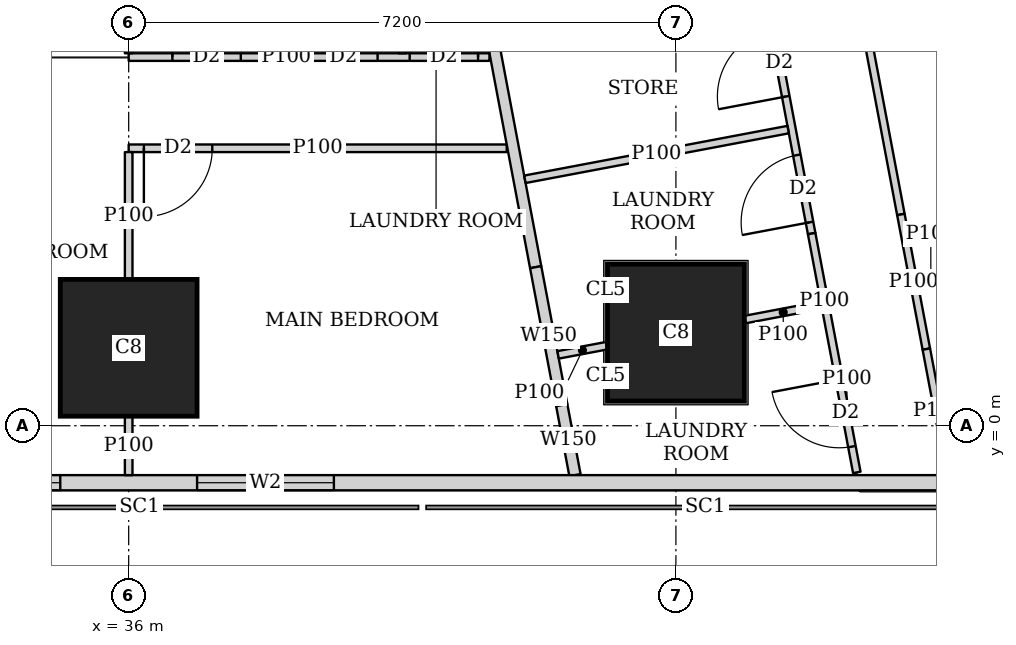
"""IFC4 building model, lengths in metres.
Left out: names, types, materials, properties, quantities, classifications, styles, units other than length and angle.
Written with IfcOpenShell. Run it as: python <this file> out.ifc"""

import sys

from ifc_helpers import new_model, si_unit, direction, frame, frame_2d, origin, origin_2d, place, context, subcontext, project, spatial, rectangle, extrude, element, fill, save


model = new_model("IFC4")
c1 = context("Model", 3, precision=1e-05, world=origin(), true_north=direction((0.0, 1.0)))
c2 = subcontext(c1, "Body", "Model", "MODEL_VIEW")
j1 = project(units=[si_unit("LENGTHUNIT", "METRE"), si_unit("PLANEANGLEUNIT", "RADIAN")], contexts=[c1])
p1 = place(None, origin())
s1 = spatial("IfcSite", under=j1, at=p1, CompositionType="ELEMENT")
p2 = place(p1, origin())
s2 = spatial("IfcBuilding", under=s1, at=p2, CompositionType="ELEMENT")
p3 = place(p2, frame((0.0, 0.0, 135.8)))
s3 = spatial("IfcBuildingStorey", under=s2, at=p3, CompositionType="ELEMENT", Elevation=135.8)
for number, where, z_axis, x_axis in (
    (1, (36.0, 1.025, 0.0), (0.0, 0.0, 1.0), (1.0, 0.0, 0.0)),
    (2, (43.2, 1.225, 0.0), (0.0, 0.0, 1.0), (1.0, 0.0, 0.0)),
):
    element("IfcColumn", number, at=place(p3, frame(where, z_axis=z_axis, x_axis=x_axis)), inside=s3, PredefinedType="COLUMN", context=c2, shape_type="SweptSolid", body=[
        extrude(rectangle(XDim=1.8, YDim=1.8, at=origin_2d()), origin(), (0.0, 0.0, 1.0), 3.75),
    ])
p4 = place(p3, frame((2.163, -0.75, 0.0), z_axis=(0.0, 0.0, 1.0), x_axis=(1.0, 0.0, 0.0)))
e3 = element("IfcWall", 3, at=p4, inside=s3, PredefinedType="SOLIDWALL", context=c2, shape_type="SweptSolid", body=[
    extrude(rectangle(XDim=45.628, YDim=0.2, at=frame_2d((22.814, 0.0))), origin(), (0.0, 0.0, 1.0), 3.5),
])
p5 = place(p4, frame((9.537, 0.0, 0.9)))
e4 = element("IfcOpeningElement", 4, at=p5, cuts=e3, PredefinedType="OPENING", context=c2, shape_type="SweptSolid", body=[
    extrude(rectangle(XDim=1.8, YDim=1.5, at=frame_2d((0.9, 0.75))), frame((0.0, 0.11, 0.0), z_axis=(0.0, -1.0, 0.0), x_axis=(1.0, 0.0, 0.0)), (0.0, 0.0, 1.0), 0.22),
])
p6 = place(p4, frame((13.137, 0.0, 0.9)))
e5 = element("IfcOpeningElement", 5, at=p6, cuts=e3, PredefinedType="OPENING", context=c2, shape_type="SweptSolid", body=[
    extrude(rectangle(XDim=1.8, YDim=1.5, at=frame_2d((0.9, 0.75))), frame((0.0, 0.11, 0.0), z_axis=(0.0, -1.0, 0.0), x_axis=(1.0, 0.0, 0.0)), (0.0, 0.0, 1.0), 0.22),
])
p7 = place(p4, frame((16.737, 0.0, 0.9)))
e6 = element("IfcOpeningElement", 6, at=p7, cuts=e3, PredefinedType="OPENING", context=c2, shape_type="SweptSolid", body=[
    extrude(rectangle(XDim=1.8, YDim=1.5, at=frame_2d((0.9, 0.75))), frame((0.0, 0.11, 0.0), z_axis=(0.0, -1.0, 0.0), x_axis=(1.0, 0.0, 0.0)), (0.0, 0.0, 1.0), 0.22),
])
p8 = place(p4, frame((20.337, 0.0, 0.9)))
e7 = element("IfcOpeningElement", 7, at=p8, cuts=e3, PredefinedType="OPENING", context=c2, shape_type="SweptSolid", body=[
    extrude(rectangle(XDim=1.8, YDim=1.5, at=frame_2d((0.9, 0.75))), frame((0.0, 0.11, 0.0), z_axis=(0.0, -1.0, 0.0), x_axis=(1.0, 0.0, 0.0)), (0.0, 0.0, 1.0), 0.22),
])
p9 = place(p4, frame((23.937, 0.0, 0.9)))
e8 = element("IfcOpeningElement", 8, at=p9, cuts=e3, PredefinedType="OPENING", context=c2, shape_type="SweptSolid", body=[
    extrude(rectangle(XDim=1.8, YDim=1.5, at=frame_2d((0.9, 0.75))), frame((0.0, 0.11, 0.0), z_axis=(0.0, -1.0, 0.0), x_axis=(1.0, 0.0, 0.0)), (0.0, 0.0, 1.0), 0.22),
])
p10 = place(p4, frame((27.537, 0.0, 0.9)))
e9 = element("IfcOpeningElement", 9, at=p10, cuts=e3, PredefinedType="OPENING", context=c2, shape_type="SweptSolid", body=[
    extrude(rectangle(XDim=1.8, YDim=1.5, at=frame_2d((0.9, 0.75))), frame((0.0, 0.11, 0.0), z_axis=(0.0, -1.0, 0.0), x_axis=(1.0, 0.0, 0.0)), (0.0, 0.0, 1.0), 0.22),
])
p11 = place(p4, frame((31.137, 0.0, 0.9)))
e10 = element("IfcOpeningElement", 10, at=p11, cuts=e3, PredefinedType="OPENING", context=c2, shape_type="SweptSolid", body=[
    extrude(rectangle(XDim=1.8, YDim=1.5, at=frame_2d((0.9, 0.75))), frame((0.0, 0.11, 0.0), z_axis=(0.0, -1.0, 0.0), x_axis=(1.0, 0.0, 0.0)), (0.0, 0.0, 1.0), 0.22),
])
p12 = place(p4, frame((34.737, 0.0, 0.9)))
e11 = element("IfcOpeningElement", 11, at=p12, cuts=e3, PredefinedType="OPENING", context=c2, shape_type="SweptSolid", body=[
    extrude(rectangle(XDim=1.8, YDim=1.5, at=frame_2d((0.9, 0.75))), frame((0.0, 0.11, 0.0), z_axis=(0.0, -1.0, 0.0), x_axis=(1.0, 0.0, 0.0)), (0.0, 0.0, 1.0), 0.22),
])
p13 = place(p3, frame((50.653, 2.703, 0.0), z_axis=(0.0, 0.0, 1.0), x_axis=(-0.185612026696, 0.982623109613, 0.0)))
e12 = element("IfcWall", 12, at=p13, inside=s3, PredefinedType="SOLIDWALL", context=c2, shape_type="SweptSolid", body=[
    extrude(rectangle(XDim=41.393, YDim=0.2, at=frame_2d((20.697, 0.0))), origin(), (0.0, 0.0, 1.0), 3.5),
])
p14 = place(p13, frame((1.633, 0.0, 0.9)))
e13 = element("IfcOpeningElement", 13, at=p14, cuts=e12, PredefinedType="OPENING", context=c2, shape_type="SweptSolid", body=[
    extrude(rectangle(XDim=1.8, YDim=1.5, at=frame_2d((0.9, 0.75))), frame((0.0, 0.11, 0.0), z_axis=(0.0, -1.0, 0.0), x_axis=(1.0, 0.0, 0.0)), (0.0, 0.0, 1.0), 0.22),
])
p15 = place(p13, frame((6.032, 0.0, 0.9)))
e14 = element("IfcOpeningElement", 14, at=p15, cuts=e12, PredefinedType="OPENING", context=c2, shape_type="SweptSolid", body=[
    extrude(rectangle(XDim=1.8, YDim=1.5, at=frame_2d((0.9, 0.75))), frame((0.0, 0.11, 0.0), z_axis=(0.0, -1.0, 0.0), x_axis=(1.0, 0.0, 0.0)), (0.0, 0.0, 1.0), 0.22),
])
p16 = place(p13, frame((9.848, 0.0, 0.9)))
e15 = element("IfcOpeningElement", 15, at=p16, cuts=e12, PredefinedType="OPENING", context=c2, shape_type="SweptSolid", body=[
    extrude(rectangle(XDim=1.8, YDim=1.5, at=frame_2d((0.9, 0.75))), frame((0.0, 0.11, 0.0), z_axis=(0.0, -1.0, 0.0), x_axis=(1.0, 0.0, 0.0)), (0.0, 0.0, 1.0), 0.22),
])
p17 = place(p13, frame((13.664, 0.0, 0.9)))
e16 = element("IfcOpeningElement", 16, at=p17, cuts=e12, PredefinedType="OPENING", context=c2, shape_type="SweptSolid", body=[
    extrude(rectangle(XDim=1.8, YDim=1.5, at=frame_2d((0.9, 0.75))), frame((0.0, 0.11, 0.0), z_axis=(0.0, -1.0, 0.0), x_axis=(1.0, 0.0, 0.0)), (0.0, 0.0, 1.0), 0.22),
])
p18 = place(p13, frame((17.481, 0.0, 0.9)))
e17 = element("IfcOpeningElement", 17, at=p18, cuts=e12, PredefinedType="OPENING", context=c2, shape_type="SweptSolid", body=[
    extrude(rectangle(XDim=1.8, YDim=1.5, at=frame_2d((0.9, 0.75))), frame((0.0, 0.11, 0.0), z_axis=(0.0, -1.0, 0.0), x_axis=(1.0, 0.0, 0.0)), (0.0, 0.0, 1.0), 0.22),
])
p19 = place(p13, frame((21.297, 0.0, 0.9)))
e18 = element("IfcOpeningElement", 18, at=p19, cuts=e12, PredefinedType="OPENING", context=c2, shape_type="SweptSolid", body=[
    extrude(rectangle(XDim=1.8, YDim=1.5, at=frame_2d((0.9, 0.75))), frame((0.0, 0.11, 0.0), z_axis=(0.0, -1.0, 0.0), x_axis=(1.0, 0.0, 0.0)), (0.0, 0.0, 1.0), 0.22),
])
p20 = place(p13, frame((25.113, 0.0, 0.9)))
e19 = element("IfcOpeningElement", 19, at=p20, cuts=e12, PredefinedType="OPENING", context=c2, shape_type="SweptSolid", body=[
    extrude(rectangle(XDim=1.8, YDim=1.5, at=frame_2d((0.9, 0.75))), frame((0.0, 0.11, 0.0), z_axis=(0.0, -1.0, 0.0), x_axis=(1.0, 0.0, 0.0)), (0.0, 0.0, 1.0), 0.22),
])
p21 = place(p13, frame((28.93, 0.0, 0.9)))
e20 = element("IfcOpeningElement", 20, at=p21, cuts=e12, PredefinedType="OPENING", context=c2, shape_type="SweptSolid", body=[
    extrude(rectangle(XDim=1.8, YDim=1.5, at=frame_2d((0.9, 0.75))), frame((0.0, 0.11, 0.0), z_axis=(0.0, -1.0, 0.0), x_axis=(1.0, 0.0, 0.0)), (0.0, 0.0, 1.0), 0.22),
])
p22 = place(p13, frame((32.746, 0.0, 0.9)))
e21 = element("IfcOpeningElement", 21, at=p22, cuts=e12, PredefinedType="OPENING", context=c2, shape_type="SweptSolid", body=[
    extrude(rectangle(XDim=1.8, YDim=1.5, at=frame_2d((0.9, 0.75))), frame((0.0, 0.11, 0.0), z_axis=(0.0, -1.0, 0.0), x_axis=(1.0, 0.0, 0.0)), (0.0, 0.0, 1.0), 0.22),
])
p23 = place(p13, frame((36.481, 0.0, 0.9)))
e22 = element("IfcOpeningElement", 22, at=p23, cuts=e12, PredefinedType="OPENING", context=c2, shape_type="SweptSolid", body=[
    extrude(rectangle(XDim=1.8, YDim=1.5, at=frame_2d((0.9, 0.75))), frame((0.0, 0.11, 0.0), z_axis=(0.0, -1.0, 0.0), x_axis=(1.0, 0.0, 0.0)), (0.0, 0.0, 1.0), 0.22),
])
p24 = place(p3, frame((33.623, 43.022, 0.0), z_axis=(0.0, 0.0, 1.0), x_axis=(0.185596841028, -0.98262597798, 0.0)))
e23 = element("IfcWall", 23, at=p24, inside=s3, PredefinedType="SOLIDWALL", context=c2, shape_type="SweptSolid", body=[
    extrude(rectangle(XDim=41.66, YDim=0.15, at=frame_2d((20.83, 0.0))), origin(), (0.0, 0.0, 1.0), 2.5),
])
p25 = place(p24, frame((20.242, 0.0, 0.0)))
e24 = element("IfcOpeningElement", 24, at=p25, cuts=e23, PredefinedType="OPENING", context=c2, shape_type="SweptSolid", body=[
    extrude(rectangle(XDim=1.0, YDim=2.1, at=frame_2d((0.5, 1.05))), frame((0.0, 0.085, 0.0), z_axis=(0.0, -1.0, 0.0), x_axis=(1.0, 0.0, 0.0)), (0.0, 0.0, 1.0), 0.17),
])
p26 = place(p24, frame((24.714, 0.0, 0.0)))
e25 = element("IfcOpeningElement", 25, at=p26, cuts=e23, PredefinedType="OPENING", context=c2, shape_type="SweptSolid", body=[
    extrude(rectangle(XDim=1.0, YDim=2.1, at=frame_2d((0.5, 1.05))), frame((0.0, 0.085, 0.0), z_axis=(0.0, -1.0, 0.0), x_axis=(1.0, 0.0, 0.0)), (0.0, 0.0, 1.0), 0.17),
])
p27 = place(p24, frame((31.206, 0.0, 0.0)))
e26 = element("IfcOpeningElement", 26, at=p27, cuts=e23, PredefinedType="OPENING", context=c2, shape_type="SweptSolid", body=[
    extrude(rectangle(XDim=1.0, YDim=2.1, at=frame_2d((0.5, 1.05))), frame((0.0, 0.085, 0.0), z_axis=(0.0, -1.0, 0.0), x_axis=(1.0, 0.0, 0.0)), (0.0, 0.0, 1.0), 0.17),
])
p28 = place(p3, frame((41.355, 2.086, 0.0), z_axis=(0.0, 0.0, 1.0), x_axis=(0.185708872674, -0.982604811005, 0.0)))
e27 = element("IfcWall", 27, at=p28, inside=s3, PredefinedType="SOLIDWALL", context=c2, shape_type="SweptSolid", body=[
    extrude(rectangle(XDim=1.847, YDim=0.15, at=frame_2d((0.924, 0.0))), origin(), (0.0, 0.0, 1.0), 2.1),
])
p29 = place(p3, frame((41.698, 0.271, 0.0), z_axis=(0.0, 0.0, 1.0), x_axis=(0.185735329995, -0.982599810295, 0.0)))
e28 = element("IfcWall", 28, at=p29, inside=s3, PredefinedType="SOLIDWALL", context=c2, shape_type="SweptSolid", body=[
    extrude(rectangle(XDim=0.937, YDim=0.15, at=frame_2d((0.469, 0.0))), origin(), (0.0, 0.0, 1.0), 3.5),
])
p30 = place(p3, frame((40.974, 3.65, 0.0), z_axis=(0.0, 0.0, 1.0), x_axis=(-1.0, 0.0, 0.0)))
e29 = element("IfcWall", 29, at=p30, inside=s3, PredefinedType="PARTITIONING", context=c2, shape_type="SweptSolid", body=[
    extrude(rectangle(XDim=4.974, YDim=0.1, at=frame_2d((2.487, 0.0))), origin(), (0.0, 0.0, 1.0), 3.5),
])
p31 = place(p30, frame((3.874, 0.0, 0.0)))
e30 = element("IfcOpeningElement", 30, at=p31, cuts=e29, PredefinedType="OPENING", context=c2, shape_type="SweptSolid", body=[
    extrude(rectangle(XDim=0.9, YDim=2.1, at=frame_2d((0.45, 1.05))), frame((0.0, 0.06, 0.0), z_axis=(0.0, -1.0, 0.0), x_axis=(1.0, 0.0, 0.0)), (0.0, 0.0, 1.0), 0.12),
])
p32 = place(p3, frame((40.747, 4.85, 0.0), z_axis=(0.0, 0.0, 1.0), x_axis=(-1.0, 0.0, 0.0)))
e31 = element("IfcWall", 31, at=p32, inside=s3, PredefinedType="PARTITIONING", context=c2, shape_type="SweptSolid", body=[
    extrude(rectangle(XDim=4.747, YDim=0.1, at=frame_2d((2.374, 0.0))), origin(), (0.0, 0.0, 1.0), 3.5),
])
p33 = place(p32, frame((3.272, 0.0, 0.0)))
e32 = element("IfcOpeningElement", 32, at=p33, cuts=e31, PredefinedType="OPENING", context=c2, shape_type="SweptSolid", body=[
    extrude(rectangle(XDim=0.9, YDim=2.1, at=frame_2d((0.45, 1.05))), frame((0.0, 0.06, 0.0), z_axis=(0.0, -1.0, 0.0), x_axis=(1.0, 0.0, 0.0)), (0.0, 0.0, 1.0), 0.12),
])
p34 = place(p32, frame((0.15, 0.0, 0.0)))
e33 = element("IfcOpeningElement", 33, at=p34, cuts=e31, PredefinedType="OPENING", context=c2, shape_type="SweptSolid", body=[
    extrude(rectangle(XDim=0.9, YDim=2.1, at=frame_2d((0.45, 1.05))), frame((0.0, 0.06, 0.0), z_axis=(0.0, -1.0, 0.0), x_axis=(1.0, 0.0, 0.0)), (0.0, 0.0, 1.0), 0.12),
])
p35 = place(p32, frame((1.472, 0.0, 0.0)))
e34 = element("IfcOpeningElement", 34, at=p35, cuts=e31, PredefinedType="OPENING", context=c2, shape_type="SweptSolid", body=[
    extrude(rectangle(XDim=0.9, YDim=2.1, at=frame_2d((0.45, 1.05))), frame((0.0, 0.06, 0.0), z_axis=(0.0, -1.0, 0.0), x_axis=(1.0, 0.0, 0.0)), (0.0, 0.0, 1.0), 0.12),
])
p36 = place(p3, frame((36.0, -0.65, 0.0), z_axis=(0.0, 0.0, 1.0), x_axis=(0.0, 1.0, 0.0)))
e35 = element("IfcWall", 35, at=p36, inside=s3, PredefinedType="PARTITIONING", context=c2, shape_type="SweptSolid", body=[
    extrude(rectangle(XDim=0.774, YDim=0.1, at=frame_2d((0.387, 0.0))), origin(), (0.0, 0.0, 1.0), 3.5),
])
p37 = place(p3, frame((36.0, 1.926, 0.0), z_axis=(0.0, 0.0, 1.0), x_axis=(0.0, 1.0, 0.0)))
e36 = element("IfcWall", 36, at=p37, inside=s3, PredefinedType="PARTITIONING", context=c2, shape_type="SweptSolid", body=[
    extrude(rectangle(XDim=1.674, YDim=0.1, at=frame_2d((0.837, 0.0))), origin(), (0.0, 0.0, 1.0), 3.5),
])
p38 = place(p3, frame((36.0, 4.9, 0.0), z_axis=(0.0, 0.0, 1.0), x_axis=(0.0, 1.0, 0.0)))
e37 = element("IfcWall", 37, at=p38, inside=s3, PredefinedType="PARTITIONING", context=c2, shape_type="SweptSolid", body=[
    extrude(rectangle(XDim=1.849, YDim=0.1, at=frame_2d((0.925, 0.0))), origin(), (0.0, 0.0, 1.0), 3.5),
])
for number, where, z_axis, x_axis in (
    (38, (39.6, 4.9, 0.0), (0.0, 0.0, 1.0), (0.0, 1.0, 0.0)),
    (39, (38.05, 4.9, 0.0), (0.0, 0.0, 1.0), (0.0, 1.0, 0.0)),
):
    element("IfcWall", number, at=place(p3, frame(where, z_axis=z_axis, x_axis=x_axis)), inside=s3, PredefinedType="PARTITIONING", context=c2, shape_type="SweptSolid", body=[
        extrude(rectangle(XDim=3.525, YDim=0.1, at=frame_2d((1.763, 0.0))), origin(), (0.0, 0.0, 1.0), 3.5),
    ])
p39 = place(p3, frame((44.727, 10.366, 0.0), z_axis=(0.0, 0.0, 1.0), x_axis=(0.185578957652, -0.982629355595, 0.0)))
e40 = element("IfcWall", 40, at=p39, inside=s3, PredefinedType="PARTITIONING", context=c2, shape_type="SweptSolid", body=[
    extrude(rectangle(XDim=7.721, YDim=0.1, at=frame_2d((3.86, 0.0))), origin(), (0.0, 0.0, 1.0), 3.5),
])
p40 = place(p39, frame((0.151, 0.0, 0.0)))
e41 = element("IfcOpeningElement", 41, at=p40, cuts=e40, PredefinedType="OPENING", context=c2, shape_type="SweptSolid", body=[
    extrude(rectangle(XDim=0.9, YDim=2.1, at=frame_2d((0.45, 1.05))), frame((0.0, 0.06, 0.0), z_axis=(0.0, -1.0, 0.0), x_axis=(1.0, 0.0, 0.0)), (0.0, 0.0, 1.0), 0.12),
])
p41 = place(p39, frame((3.806, 0.0, 0.0)))
e42 = element("IfcOpeningElement", 42, at=p41, cuts=e40, PredefinedType="OPENING", context=c2, shape_type="SweptSolid", body=[
    extrude(rectangle(XDim=0.9, YDim=2.1, at=frame_2d((0.45, 1.05))), frame((0.0, 0.06, 0.0), z_axis=(0.0, -1.0, 0.0), x_axis=(1.0, 0.0, 0.0)), (0.0, 0.0, 1.0), 0.12),
])
p42 = place(p3, frame((46.16, 2.779, 0.0), z_axis=(0.0, 0.0, 1.0), x_axis=(0.18597295662, -0.982554863306, 0.0)))
e43 = element("IfcWall", 43, at=p42, inside=s3, PredefinedType="PARTITIONING", context=c2, shape_type="SweptSolid", body=[
    extrude(rectangle(XDim=1.802, YDim=0.1, at=frame_2d((0.901, 0.0))), origin(), (0.0, 0.0, 1.0), 2.1),
])
p43 = place(p3, frame((46.495, 1.008, 0.0), z_axis=(0.0, 0.0, 1.0), x_axis=(0.185535059532, -0.982637645159, 0.0)))
e44 = element("IfcWall", 44, at=p43, inside=s3, PredefinedType="PARTITIONING", context=c2, shape_type="SweptSolid", body=[
    extrude(rectangle(XDim=1.644, YDim=0.1, at=frame_2d((0.822, 0.0))), origin(), (0.0, 0.0, 1.0), 3.5),
])
p44 = place(p3, frame((43.999, 7.755, 0.0), z_axis=(0.0, 0.0, 1.0), x_axis=(0.185565904578, -0.982631820703, 0.0)))
e45 = element("IfcWall", 45, at=p44, inside=s3, PredefinedType="PARTITIONING", context=c2, shape_type="SweptSolid", body=[
    extrude(rectangle(XDim=5.319, YDim=0.1, at=frame_2d((2.66, 0.0))), origin(), (0.0, 0.0, 1.0), 3.5),
])
p45 = place(p44, frame((1.0, 0.0, 0.0)))
e46 = element("IfcOpeningElement", 46, at=p45, cuts=e45, PredefinedType="OPENING", context=c2, shape_type="SweptSolid", body=[
    extrude(rectangle(XDim=0.9, YDim=2.1, at=frame_2d((0.45, 1.05))), frame((0.0, 0.06, 0.0), z_axis=(0.0, -1.0, 0.0), x_axis=(1.0, 0.0, 0.0)), (0.0, 0.0, 1.0), 0.12),
])
p46 = place(p44, frame((4.269, 0.0, 0.0)))
e47 = element("IfcOpeningElement", 47, at=p46, cuts=e45, PredefinedType="OPENING", context=c2, shape_type="SweptSolid", body=[
    extrude(rectangle(XDim=0.9, YDim=2.1, at=frame_2d((0.45, 1.05))), frame((0.0, 0.06, 0.0), z_axis=(0.0, -1.0, 0.0), x_axis=(1.0, 0.0, 0.0)), (0.0, 0.0, 1.0), 0.12),
])
p47 = place(p44, frame((2.585, 0.0, 0.0)))
e48 = element("IfcOpeningElement", 48, at=p47, cuts=e45, PredefinedType="OPENING", context=c2, shape_type="SweptSolid", body=[
    extrude(rectangle(XDim=0.9, YDim=2.1, at=frame_2d((0.45, 1.05))), frame((0.0, 0.06, 0.0), z_axis=(0.0, -1.0, 0.0), x_axis=(1.0, 0.0, 0.0)), (0.0, 0.0, 1.0), 0.12),
])
p48 = place(p3, frame((44.986, 2.528, 0.0), z_axis=(0.0, 0.0, 1.0), x_axis=(0.18584218627, -0.982579605835, 0.0)))
e49 = element("IfcWall", 49, at=p48, inside=s3, PredefinedType="PARTITIONING", context=c2, shape_type="SweptSolid", body=[
    extrude(rectangle(XDim=1.802, YDim=0.1, at=frame_2d((0.901, 0.0))), origin(), (0.0, 0.0, 1.0), 2.1),
])
p49 = place(p3, frame((45.321, 0.757, 0.0), z_axis=(0.0, 0.0, 1.0), x_axis=(0.185640562635, -0.982617718904, 0.0)))
e50 = element("IfcWall", 50, at=p49, inside=s3, PredefinedType="PARTITIONING", context=c2, shape_type="SweptSolid", body=[
    extrude(rectangle(XDim=1.395, YDim=0.1, at=frame_2d((0.698, 0.0))), origin(), (0.0, 0.0, 1.0), 3.5),
])
p50 = place(p49, frame((0.15, 0.0, 0.0)))
e51 = element("IfcOpeningElement", 51, at=p50, cuts=e50, PredefinedType="OPENING", context=c2, shape_type="SweptSolid", body=[
    extrude(rectangle(XDim=0.9, YDim=2.1, at=frame_2d((0.45, 1.05))), frame((0.0, 0.06, 0.0), z_axis=(0.0, -1.0, 0.0), x_axis=(1.0, 0.0, 0.0)), (0.0, 0.0, 1.0), 0.12),
])
p51 = place(p3, frame((46.738, 2.006, 0.0), z_axis=(0.0, 0.0, 1.0), x_axis=(-0.982820466874, -0.184564161994, 0.0)))
e52 = element("IfcWall", 52, at=p51, inside=s3, PredefinedType="PARTITIONING", context=c2, shape_type="SweptSolid", body=[
    extrude(rectangle(XDim=0.374, YDim=0.1, at=frame_2d((0.187, 0.0))), origin(), (0.0, 0.0, 1.0), 2.1),
])
p52 = place(p3, frame((45.114, 1.587, 0.0), z_axis=(0.0, 0.0, 1.0), x_axis=(-0.982567886437, -0.185904138047, 0.0)))
e53 = element("IfcWall", 53, at=p52, inside=s3, PredefinedType="PARTITIONING", context=c2, shape_type="SweptSolid", body=[
    extrude(rectangle(XDim=1.022, YDim=0.1, at=frame_2d((0.511, 0.0))), origin(), (0.0, 0.0, 1.0), 2.1),
])
p53 = place(p3, frame((42.29, 1.053, 0.0), z_axis=(0.0, 0.0, 1.0), x_axis=(-0.982573945355, -0.185872111707, 0.0)))
e54 = element("IfcWall", 54, at=p53, inside=s3, PredefinedType="PARTITIONING", context=c2, shape_type="SweptSolid", body=[
    extrude(rectangle(XDim=0.652, YDim=0.1, at=frame_2d((0.326, 0.0))), origin(), (0.0, 0.0, 1.0), 2.1),
])
p54 = place(p3, frame((44.677, 3.896, 0.0), z_axis=(0.0, 0.0, 1.0), x_axis=(-0.982638553676, -0.185530247748, 0.0)))
e55 = element("IfcWall", 55, at=p54, inside=s3, PredefinedType="PARTITIONING", context=c2, shape_type="SweptSolid", body=[
    extrude(rectangle(XDim=3.525, YDim=0.1, at=frame_2d((1.763, 0.0))), origin(), (0.0, 0.0, 1.0), 3.5),
])
p55 = place(p11, origin())
e56 = element("IfcWindow", 56, at=p55, inside=s3, PartitioningType="SINGLE_PANEL", PredefinedType="WINDOW", context=c2, shape_type="SweptSolid", body=[
    extrude(rectangle(XDim=1.8, YDim=1.5, at=frame_2d((0.9, 0.75))), frame((0.0, 0.03, 0.0), z_axis=(0.0, -1.0, 0.0), x_axis=(1.0, 0.0, 0.0)), (0.0, 0.0, 1.0), 0.06),
])
fill(e10, e56)
p56 = place(p12, origin())
e57 = element("IfcWindow", 57, at=p56, inside=s3, PartitioningType="SINGLE_PANEL", PredefinedType="WINDOW", context=c2, shape_type="SweptSolid", body=[
    extrude(rectangle(XDim=1.8, YDim=1.5, at=frame_2d((0.9, 0.75))), frame((0.0, 0.03, 0.0), z_axis=(0.0, -1.0, 0.0), x_axis=(1.0, 0.0, 0.0)), (0.0, 0.0, 1.0), 0.06),
])
fill(e11, e57)
p57 = place(p31, origin())
e58 = element("IfcDoor", 58, at=p57, inside=s3, OperationType="SINGLE_SWING_RIGHT", PredefinedType="DOOR", context=c2, shape_type="SweptSolid", body=[
    extrude(rectangle(XDim=0.9, YDim=2.1, at=frame_2d((0.45, 1.05))), frame((0.0, 0.025, 0.0), z_axis=(0.0, -1.0, 0.0), x_axis=(1.0, 0.0, 0.0)), (0.0, 0.0, 1.0), 0.05),
])
fill(e30, e58)
p58 = place(p33, origin())
e59 = element("IfcDoor", 59, at=p58, inside=s3, OperationType="SINGLE_SWING_LEFT", PredefinedType="DOOR", context=c2, shape_type="SweptSolid", body=[
    extrude(rectangle(XDim=0.9, YDim=2.1, at=frame_2d((0.45, 1.05))), frame((0.0, 0.025, 0.0), z_axis=(0.0, -1.0, 0.0), x_axis=(1.0, 0.0, 0.0)), (0.0, 0.0, 1.0), 0.05),
])
fill(e32, e59)
p59 = place(p34, origin())
e60 = element("IfcDoor", 60, at=p59, inside=s3, OperationType="SINGLE_SWING_RIGHT", PredefinedType="DOOR", context=c2, shape_type="SweptSolid", body=[
    extrude(rectangle(XDim=0.9, YDim=2.1, at=frame_2d((0.45, 1.05))), frame((0.0, 0.025, 0.0), z_axis=(0.0, -1.0, 0.0), x_axis=(1.0, 0.0, 0.0)), (0.0, 0.0, 1.0), 0.05),
])
fill(e33, e60)
p60 = place(p35, origin())
e61 = element("IfcDoor", 61, at=p60, inside=s3, OperationType="SINGLE_SWING_LEFT", PredefinedType="DOOR", context=c2, shape_type="SweptSolid", body=[
    extrude(rectangle(XDim=0.9, YDim=2.1, at=frame_2d((0.45, 1.05))), frame((0.0, 0.025, 0.0), z_axis=(0.0, -1.0, 0.0), x_axis=(1.0, 0.0, 0.0)), (0.0, 0.0, 1.0), 0.05),
])
fill(e34, e61)
p61 = place(p46, origin())
e62 = element("IfcDoor", 62, at=p61, inside=s3, OperationType="SINGLE_SWING_LEFT", PredefinedType="DOOR", context=c2, shape_type="SweptSolid", body=[
    extrude(rectangle(XDim=0.9, YDim=2.1, at=frame_2d((0.45, 1.05))), frame((0.0, 0.025, 0.0), z_axis=(0.0, -1.0, 0.0), x_axis=(1.0, 0.0, 0.0)), (0.0, 0.0, 1.0), 0.05),
])
fill(e47, e62)
p62 = place(p50, origin())
e63 = element("IfcDoor", 63, at=p62, inside=s3, OperationType="SINGLE_SWING_RIGHT", PredefinedType="DOOR", context=c2, shape_type="SweptSolid", body=[
    extrude(rectangle(XDim=0.9, YDim=2.1, at=frame_2d((0.45, 1.05))), frame((0.0, 0.025, 0.0), z_axis=(0.0, -1.0, 0.0), x_axis=(1.0, 0.0, 0.0)), (0.0, 0.0, 1.0), 0.05),
])
fill(e51, e63)
p63 = place(p47, origin())
e64 = element("IfcDoor", 64, at=p63, inside=s3, OperationType="SINGLE_SWING_LEFT", PredefinedType="DOOR", context=c2, shape_type="SweptSolid", body=[
    extrude(rectangle(XDim=0.9, YDim=2.1, at=frame_2d((0.45, 1.05))), frame((0.0, 0.025, 0.0), z_axis=(0.0, -1.0, 0.0), x_axis=(1.0, 0.0, 0.0)), (0.0, 0.0, 1.0), 0.05),
])
fill(e48, e64)
save(model, sys.argv[1])
